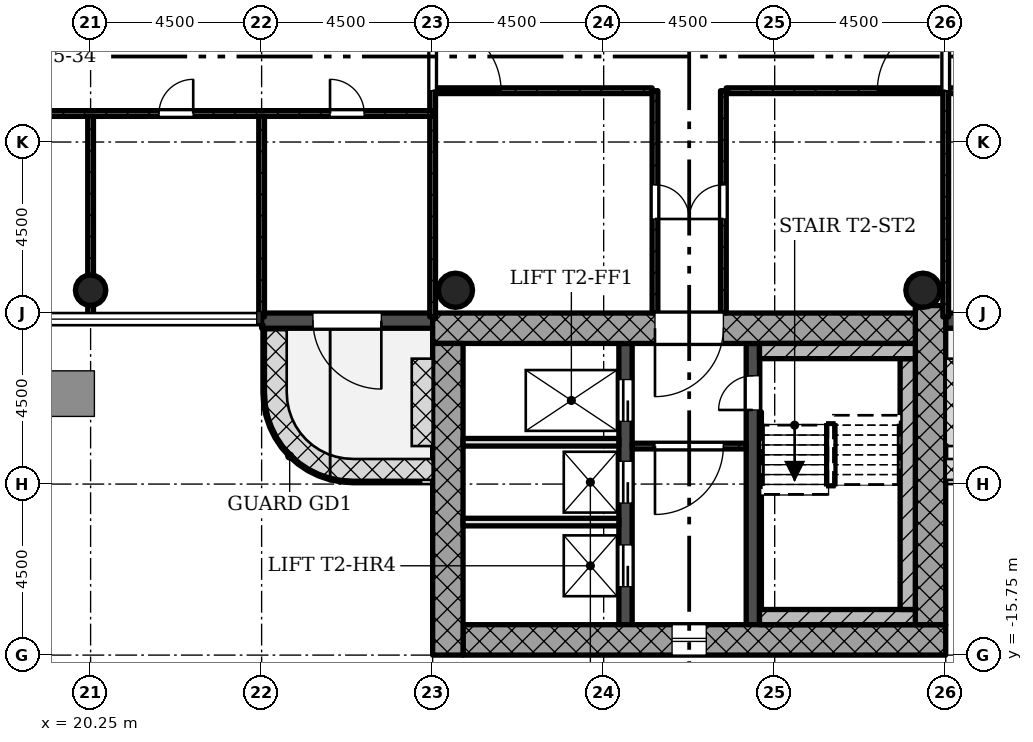
"""IFC4 building model, lengths in metres.
Left out: names, types, materials, properties, quantities, classifications, styles, units other than length and angle.
Written with IfcOpenShell. Run it as: python <this file> out.ifc"""

import sys

from ifc_helpers import new_model, si_unit, direction, frame, frame_2d, origin, origin_2d, place, context, subcontext, project, spatial, rectangle, hollow_circle, extrude, element, fill, save


model = new_model("IFC4")
c1 = context("Model", 3, precision=1e-05, world=origin(), true_north=direction((0.0, 1.0)))
c2 = subcontext(c1, "Body", "Model", "MODEL_VIEW")
j1 = project(units=[si_unit("LENGTHUNIT", "METRE"), si_unit("PLANEANGLEUNIT", "RADIAN")], contexts=[c1])
p1 = place(None, origin())
s1 = spatial("IfcSite", under=j1, at=p1, CompositionType="ELEMENT")
p2 = place(p1, origin())
s2 = spatial("IfcBuilding", under=s1, at=p2, CompositionType="ELEMENT")
p3 = place(p2, frame((0.0, 0.0, 128.7)))
s3 = spatial("IfcBuildingStorey", under=s2, at=p3, CompositionType="ELEMENT", Elevation=128.7)
p4 = place(p3, frame((30.05, -15.35, 0.0), z_axis=(0.0, 0.0, 1.0), x_axis=(1.0, 0.0, 0.0)))
e1 = element("IfcWall", 1, at=p4, inside=s3, PredefinedType="SHEAR", context=c2, shape_type="SweptSolid", body=[
    extrude(rectangle(XDim=12.7, YDim=0.8, at=frame_2d((6.35, 0.0))), origin(), (0.0, 0.0, 1.0), 5.0),
])
p5 = place(p4, frame((5.5, 0.0, 0.45)))
e2 = element("IfcOpeningElement", 2, at=p5, cuts=e1, PredefinedType="OPENING", context=c2, shape_type="SweptSolid", body=[
    extrude(rectangle(XDim=0.9, YDim=2.4, at=frame_2d((0.45, 1.2))), frame((0.0, 0.41, 0.0), z_axis=(0.0, -1.0, 0.0), x_axis=(1.0, 0.0, 0.0)), (0.0, 0.0, 1.0), 0.82),
])
p6 = place(p3, frame((42.35, -14.95, 0.0), z_axis=(0.0, 0.0, 1.0), x_axis=(0.0, 1.0, 0.0)))
e3 = element("IfcWall", 3, at=p6, inside=s3, PredefinedType="SHEAR", context=c2, shape_type="SweptSolid", body=[
    extrude(rectangle(XDim=8.398, YDim=0.8, at=frame_2d((4.199, 0.0))), origin(), (0.0, 0.0, 1.0), 5.0),
])
p7 = place(p3, frame((41.95, -7.15, 0.0), z_axis=(0.0, 0.0, 1.0), x_axis=(-1.0, 0.0, 0.0)))
e4 = element("IfcWall", 4, at=p7, inside=s3, PredefinedType="SHEAR", context=c2, shape_type="SweptSolid", body=[
    extrude(rectangle(XDim=12.7, YDim=0.8, at=frame_2d((6.35, 0.0))), origin(), (0.0, 0.0, 1.0), 5.0),
])
p8 = place(p7, frame((5.05, 0.0, 0.0)))
e5 = element("IfcOpeningElement", 5, at=p8, cuts=e4, PredefinedType="OPENING", context=c2, shape_type="SweptSolid", body=[
    extrude(rectangle(XDim=1.8, YDim=2.1, at=frame_2d((0.9, 1.05))), frame((0.0, 0.41, 0.0), z_axis=(0.0, -1.0, 0.0), x_axis=(1.0, 0.0, 0.0)), (0.0, 0.0, 1.0), 0.82),
])
p9 = place(p3, frame((29.65, -7.55, 0.0), z_axis=(0.0, 0.0, 1.0), x_axis=(0.0, -1.0, 0.0)))
e6 = element("IfcWall", 6, at=p9, inside=s3, PredefinedType="SHEAR", context=c2, shape_type="SweptSolid", body=[
    extrude(rectangle(XDim=8.2, YDim=0.8, at=frame_2d((4.1, 0.0))), origin(), (0.0, 0.0, 1.0), 5.0),
])
p10 = place(p3, frame((34.325, -14.95, 0.0), z_axis=(0.0, 0.0, 1.0), x_axis=(0.0, 1.0, 0.0)))
e7 = element("IfcWall", 7, at=p10, inside=s3, PredefinedType="SHEAR", context=c2, shape_type="SweptSolid", body=[
    extrude(rectangle(XDim=7.4, YDim=0.35, at=frame_2d((3.7, 0.0))), origin(), (0.0, 0.0, 1.0), 5.0),
])
p11 = place(p10, frame((5.35, 0.0, 0.0)))
e8 = element("IfcOpeningElement", 8, at=p11, cuts=e7, PredefinedType="OPENING", context=c2, shape_type="SweptSolid", body=[
    extrude(rectangle(XDim=1.1, YDim=2.1, at=frame_2d((0.55, 1.05))), frame((0.0, 0.185, 0.0), z_axis=(0.0, -1.0, 0.0), x_axis=(1.0, 0.0, 0.0)), (0.0, 0.0, 1.0), 0.37),
])
p12 = place(p10, frame((3.2, 0.0, 0.0)))
e9 = element("IfcOpeningElement", 9, at=p12, cuts=e7, PredefinedType="OPENING", context=c2, shape_type="SweptSolid", body=[
    extrude(rectangle(XDim=1.1, YDim=2.1, at=frame_2d((0.55, 1.05))), frame((0.0, 0.185, 0.0), z_axis=(0.0, -1.0, 0.0), x_axis=(1.0, 0.0, 0.0)), (0.0, 0.0, 1.0), 0.37),
])
p13 = place(p10, frame((1.0, 0.0, 0.0)))
e10 = element("IfcOpeningElement", 10, at=p13, cuts=e7, PredefinedType="OPENING", context=c2, shape_type="SweptSolid", body=[
    extrude(rectangle(XDim=1.1, YDim=2.1, at=frame_2d((0.55, 1.05))), frame((0.0, 0.185, 0.0), z_axis=(0.0, -1.0, 0.0), x_axis=(1.0, 0.0, 0.0)), (0.0, 0.0, 1.0), 0.37),
])
p14 = place(p3, frame((37.675, -14.95, 0.0), z_axis=(0.0, 0.0, 1.0), x_axis=(0.0, 1.0, 0.0)))
e11 = element("IfcWall", 11, at=p14, inside=s3, PredefinedType="SHEAR", context=c2, shape_type="SweptSolid", body=[
    extrude(rectangle(XDim=7.4, YDim=0.35, at=frame_2d((3.7, 0.0))), origin(), (0.0, 0.0, 1.0), 5.0),
])
p15 = place(p14, frame((5.65, 0.0, 0.0)))
e12 = element("IfcOpeningElement", 12, at=p15, cuts=e11, PredefinedType="OPENING", context=c2, shape_type="SweptSolid", body=[
    extrude(rectangle(XDim=0.9, YDim=2.1, at=frame_2d((0.45, 1.05))), frame((0.0, 0.185, 0.0), z_axis=(0.0, -1.0, 0.0), x_axis=(1.0, 0.0, 0.0)), (0.0, 0.0, 1.0), 0.37),
])
p16 = place(p3, frame((20.25, -6.15, 0.0), z_axis=(0.0, 0.0, 1.0), x_axis=(1.0, 0.0, 0.0)))
e13 = element("IfcColumn", 13, at=p16, inside=s3, PredefinedType="COLUMN", context=c2, shape_type="SweptSolid", body=[
    extrude(hollow_circle(Radius=0.4, WallThickness=0.028, at=origin_2d()), origin(), (0.0, 0.0, 1.0), 5.0),
])
for number, where, z_axis, x_axis in (
    (14, (42.15, -6.15, 0.0), (0.0, 0.0, 1.0), (1.0, 0.0, 0.0)),
    (15, (29.85, -6.15, 0.0), (0.0, 0.0, 1.0), (1.0, 0.0, 0.0)),
):
    element("IfcColumn", number, at=place(p3, frame(where, z_axis=z_axis, x_axis=x_axis)), inside=s3, PredefinedType="COLUMN", context=c2, shape_type="SweptSolid", body=[
        extrude(hollow_circle(Radius=0.45, WallThickness=0.032, at=origin_2d()), origin(), (0.0, 0.0, 1.0), 5.0),
    ])
p17 = place(p3, frame((42.75, -6.95, -0.02), z_axis=(0.0, 0.0, 1.0), x_axis=(1.0, 0.0, 0.0)))
e16 = element("IfcWall", 16, at=p17, inside=s3, PredefinedType="STANDARD", context=c2, shape_type="SweptSolid", body=[
    extrude(rectangle(XDim=4.5, YDim=0.4, at=frame_2d((2.25, 0.0))), origin(), (0.0, 0.0, 1.0), 4.72),
])
p18 = place(p17, frame((1.35, 0.0, 0.02)))
e17 = element("IfcOpeningElement", 17, at=p18, cuts=e16, PredefinedType="OPENING", context=c2, shape_type="SweptSolid", body=[
    extrude(rectangle(XDim=1.8, YDim=2.1, at=frame_2d((0.9, 1.05))), frame((0.0, 0.21, 0.0), z_axis=(0.0, -1.0, 0.0), x_axis=(1.0, 0.0, 0.0)), (0.0, 0.0, 1.0), 0.42),
])
p19 = place(p3, frame((24.75, -6.95, -0.02), z_axis=(0.0, 0.0, 1.0), x_axis=(1.0, 0.0, 0.0)))
e18 = element("IfcWall", 18, at=p19, inside=s3, PredefinedType="STANDARD", context=c2, shape_type="SweptSolid", body=[
    extrude(rectangle(XDim=4.5, YDim=0.4, at=frame_2d((2.25, 0.0))), origin(), (0.0, 0.0, 1.0), 4.72),
])
p20 = place(p19, frame((1.35, 0.0, 0.02)))
e19 = element("IfcOpeningElement", 19, at=p20, cuts=e18, PredefinedType="OPENING", context=c2, shape_type="SweptSolid", body=[
    extrude(rectangle(XDim=1.8, YDim=2.1, at=frame_2d((0.9, 1.05))), frame((0.0, 0.21, 0.0), z_axis=(0.0, -1.0, 0.0), x_axis=(1.0, 0.0, 0.0)), (0.0, 0.0, 1.0), 0.42),
])
p21 = place(p3, frame((34.5, -10.25, 0.0), z_axis=(0.0, 0.0, 1.0), x_axis=(1.0, 0.0, 0.0)))
e20 = element("IfcWall", 20, at=p21, inside=s3, PredefinedType="PARTITIONING", context=c2, shape_type="SweptSolid", body=[
    extrude(rectangle(XDim=3.0, YDim=0.15, at=frame_2d((1.5, 0.0))), origin(), (0.0, 0.0, 1.0), 4.58),
])
p22 = place(p21, frame((0.6, 0.0, 0.0)))
e21 = element("IfcOpeningElement", 21, at=p22, cuts=e20, PredefinedType="OPENING", context=c2, shape_type="SweptSolid", body=[
    extrude(rectangle(XDim=1.8, YDim=2.1, at=frame_2d((0.9, 1.05))), frame((0.0, 0.085, 0.0), z_axis=(0.0, -1.0, 0.0), x_axis=(1.0, 0.0, 0.0)), (0.0, 0.0, 1.0), 0.17),
])
for number, where, z_axis, x_axis in (
    (22, (30.05, -10.15, 0.0), (0.0, 0.0, 1.0), (1.0, 0.0, 0.0)),
    (23, (30.05, -12.25, 0.0), (0.0, 0.0, 1.0), (1.0, 0.0, 0.0)),
):
    element("IfcWall", number, at=place(p3, frame(where, z_axis=z_axis, x_axis=x_axis)), inside=s3, PredefinedType="SOLIDWALL", context=c2, shape_type="SweptSolid", body=[
        extrude(rectangle(XDim=4.1, YDim=0.2, at=frame_2d((2.05, 0.0))), origin(), (0.0, 0.0, 1.0), 4.58),
    ])
p23 = place(p3, frame((35.1, -6.75, 0.0), z_axis=(0.0, 0.0, 1.0), x_axis=(0.0, 1.0, 0.0)))
e24 = element("IfcWall", 24, at=p23, inside=s3, PredefinedType="PARTITIONING", context=c2, shape_type="SweptSolid", body=[
    extrude(rectangle(XDim=5.85, YDim=0.15, at=frame_2d((2.925, 0.0))), origin(), (0.0, 0.0, 1.0), 4.58),
])
p24 = place(p23, frame((2.475, 0.0, 0.0)))
e25 = element("IfcOpeningElement", 25, at=p24, cuts=e24, PredefinedType="OPENING", context=c2, shape_type="SweptSolid", body=[
    extrude(rectangle(XDim=0.9, YDim=2.1, at=frame_2d((0.45, 1.05))), frame((0.0, 0.085, 0.0), z_axis=(0.0, -1.0, 0.0), x_axis=(1.0, 0.0, 0.0)), (0.0, 0.0, 1.0), 0.17),
])
p25 = place(p3, frame((35.025, -0.9, 0.0), z_axis=(0.0, 0.0, 1.0), x_axis=(-1.0, 0.0, 0.0)))
e26 = element("IfcWall", 26, at=p25, inside=s3, PredefinedType="PARTITIONING", context=c2, shape_type="SweptSolid", body=[
    extrude(rectangle(XDim=5.7, YDim=0.15, at=frame_2d((2.85, 0.0))), origin(), (0.0, 0.0, 1.0), 4.58),
])
p26 = place(p3, frame((36.9, -6.75, 0.0), z_axis=(0.0, 0.0, 1.0), x_axis=(0.0, 1.0, 0.0)))
e27 = element("IfcWall", 27, at=p26, inside=s3, PredefinedType="PARTITIONING", context=c2, shape_type="SweptSolid", body=[
    extrude(rectangle(XDim=5.85, YDim=0.15, at=frame_2d((2.925, 0.0))), origin(), (0.0, 0.0, 1.0), 4.58),
])
p27 = place(p26, frame((2.475, 0.0, 0.0)))
e28 = element("IfcOpeningElement", 28, at=p27, cuts=e27, PredefinedType="OPENING", context=c2, shape_type="SweptSolid", body=[
    extrude(rectangle(XDim=0.9, YDim=2.1, at=frame_2d((0.45, 1.05))), frame((0.0, 0.085, 0.0), z_axis=(0.0, -1.0, 0.0), x_axis=(1.0, 0.0, 0.0)), (0.0, 0.0, 1.0), 0.17),
])
p28 = place(p3, frame((42.675, -0.9, 0.0), z_axis=(0.0, 0.0, 1.0), x_axis=(-1.0, 0.0, 0.0)))
e29 = element("IfcWall", 29, at=p28, inside=s3, PredefinedType="PARTITIONING", context=c2, shape_type="SweptSolid", body=[
    extrude(rectangle(XDim=5.7, YDim=0.15, at=frame_2d((2.85, 0.0))), origin(), (0.0, 0.0, 1.0), 4.58),
])
p29 = place(p3, frame((29.25, -6.85, 0.0), z_axis=(0.0, 0.0, 1.0), x_axis=(0.0, 1.0, 0.0)))
e30 = element("IfcWall", 30, at=p29, inside=s3, PredefinedType="PARTITIONING", context=c2, shape_type="SweptSolid", body=[
    extrude(rectangle(XDim=13.7, YDim=0.15, at=frame_2d((6.85, 0.0))), origin(), (0.0, 0.0, 1.0), 4.58),
])
p30 = place(p29, frame((5.95, 0.0, 0.0)))
e31 = element("IfcOpeningElement", 31, at=p30, cuts=e30, PredefinedType="OPENING", context=c2, shape_type="SweptSolid", body=[
    extrude(rectangle(XDim=1.8, YDim=2.1, at=frame_2d((0.9, 1.05))), frame((0.0, 0.085, 0.0), z_axis=(0.0, -1.0, 0.0), x_axis=(1.0, 0.0, 0.0)), (0.0, 0.0, 1.0), 0.17),
])
p31 = place(p3, frame((29.25, -1.5, 0.0), z_axis=(0.0, 0.0, 1.0), x_axis=(-1.0, 0.0, 0.0)))
e32 = element("IfcWall", 32, at=p31, inside=s3, PredefinedType="PARTITIONING", context=c2, shape_type="SweptSolid", body=[
    extrude(rectangle(XDim=13.6, YDim=0.15, at=frame_2d((6.8, 0.0))), origin(), (0.0, 0.0, 1.0), 4.58),
])
p32 = place(p31, frame((1.8, 0.0, 0.0)))
e33 = element("IfcOpeningElement", 33, at=p32, cuts=e32, PredefinedType="OPENING", context=c2, shape_type="SweptSolid", body=[
    extrude(rectangle(XDim=0.9, YDim=2.1, at=frame_2d((0.45, 1.05))), frame((0.0, 0.085, 0.0), z_axis=(0.0, -1.0, 0.0), x_axis=(1.0, 0.0, 0.0)), (0.0, 0.0, 1.0), 0.17),
])
p33 = place(p31, frame((6.3, 0.0, 0.0)))
e34 = element("IfcOpeningElement", 34, at=p33, cuts=e32, PredefinedType="OPENING", context=c2, shape_type="SweptSolid", body=[
    extrude(rectangle(XDim=0.9, YDim=2.1, at=frame_2d((0.45, 1.05))), frame((0.0, 0.085, 0.0), z_axis=(0.0, -1.0, 0.0), x_axis=(1.0, 0.0, 0.0)), (0.0, 0.0, 1.0), 0.17),
])
p34 = place(p31, frame((10.8, 0.0, 0.0)))
e35 = element("IfcOpeningElement", 35, at=p34, cuts=e32, PredefinedType="OPENING", context=c2, shape_type="SweptSolid", body=[
    extrude(rectangle(XDim=0.9, YDim=2.1, at=frame_2d((0.45, 1.05))), frame((0.0, 0.085, 0.0), z_axis=(0.0, -1.0, 0.0), x_axis=(1.0, 0.0, 0.0)), (0.0, 0.0, 1.0), 0.17),
])
for number, where, z_axis, x_axis in (
    (36, (24.75, -1.575, 0.0), (0.0, 0.0, 1.0), (0.0, -1.0, 0.0)),
    (37, (20.25, -1.575, 0.0), (0.0, 0.0, 1.0), (0.0, -1.0, 0.0)),
):
    element("IfcWall", number, at=place(p3, frame(where, z_axis=z_axis, x_axis=x_axis)), inside=s3, PredefinedType="PARTITIONING", context=c2, shape_type="SweptSolid", body=[
        extrude(rectangle(XDim=5.275, YDim=0.15, at=frame_2d((2.638, 0.0))), origin(), (0.0, 0.0, 1.0), 4.58),
    ])
p35 = place(p3, frame((42.75, -6.85, 0.0), z_axis=(0.0, 0.0, 1.0), x_axis=(0.0, 1.0, 0.0)))
e38 = element("IfcWall", 38, at=p35, inside=s3, PredefinedType="PARTITIONING", context=c2, shape_type="SweptSolid", body=[
    extrude(rectangle(XDim=13.7, YDim=0.15, at=frame_2d((6.85, 0.0))), origin(), (0.0, 0.0, 1.0), 4.58),
])
p36 = place(p35, frame((5.95, 0.0, 0.0)))
e39 = element("IfcOpeningElement", 39, at=p36, cuts=e38, PredefinedType="OPENING", context=c2, shape_type="SweptSolid", body=[
    extrude(rectangle(XDim=1.8, YDim=2.1, at=frame_2d((0.9, 1.05))), frame((0.0, 0.085, 0.0), z_axis=(0.0, -1.0, 0.0), x_axis=(1.0, 0.0, 0.0)), (0.0, 0.0, 1.0), 0.17),
])
p37 = place(p3, frame((56.35, -0.9, 0.0), z_axis=(0.0, 0.0, 1.0), x_axis=(-1.0, 0.0, 0.0)))
e40 = element("IfcWall", 40, at=p37, inside=s3, PredefinedType="PARTITIONING", context=c2, shape_type="SweptSolid", body=[
    extrude(rectangle(XDim=13.525, YDim=0.15, at=frame_2d((6.763, 0.0))), origin(), (0.0, 0.0, 1.0), 4.58),
])
p38 = place(p37, frame((1.9, 0.0, 0.0)))
e41 = element("IfcOpeningElement", 41, at=p38, cuts=e40, PredefinedType="OPENING", context=c2, shape_type="SweptSolid", body=[
    extrude(rectangle(XDim=0.9, YDim=2.1, at=frame_2d((0.45, 1.05))), frame((0.0, 0.085, 0.0), z_axis=(0.0, -1.0, 0.0), x_axis=(1.0, 0.0, 0.0)), (0.0, 0.0, 1.0), 0.17),
])
p39 = place(p37, frame((6.4, 0.0, 0.0)))
e42 = element("IfcOpeningElement", 42, at=p39, cuts=e40, PredefinedType="OPENING", context=c2, shape_type="SweptSolid", body=[
    extrude(rectangle(XDim=0.9, YDim=2.1, at=frame_2d((0.45, 1.05))), frame((0.0, 0.085, 0.0), z_axis=(0.0, -1.0, 0.0), x_axis=(1.0, 0.0, 0.0)), (0.0, 0.0, 1.0), 0.17),
])
p40 = place(p37, frame((10.9, 0.0, 0.0)))
e43 = element("IfcOpeningElement", 43, at=p40, cuts=e40, PredefinedType="OPENING", context=c2, shape_type="SweptSolid", body=[
    extrude(rectangle(XDim=0.9, YDim=2.1, at=frame_2d((0.45, 1.05))), frame((0.0, 0.085, 0.0), z_axis=(0.0, -1.0, 0.0), x_axis=(1.0, 0.0, 0.0)), (0.0, 0.0, 1.0), 0.17),
])
p41 = place(p3, frame((37.85, -14.75, 0.0), z_axis=(0.0, 0.0, 1.0), x_axis=(1.0, 0.0, 0.0)))
e44 = element("IfcWall", 44, at=p41, inside=s3, PredefinedType="SHEAR", context=c2, shape_type="SweptSolid", body=[
    extrude(rectangle(XDim=4.1, YDim=0.4, at=frame_2d((2.05, 0.0))), origin(), (0.0, 0.0, 1.0), 5.0),
])
p42 = place(p3, frame((41.75, -7.95, 0.0), z_axis=(0.0, 0.0, 1.0), x_axis=(0.0, -1.0, 0.0)))
e45 = element("IfcWall", 45, at=p42, inside=s3, PredefinedType="SHEAR", context=c2, shape_type="SweptSolid", body=[
    extrude(rectangle(XDim=6.6, YDim=0.4, at=frame_2d((3.3, 0.0))), origin(), (0.0, 0.0, 1.0), 5.0),
])
p43 = place(p3, frame((37.85, -7.75, 0.0), z_axis=(0.0, 0.0, 1.0), x_axis=(1.0, 0.0, 0.0)))
e46 = element("IfcWall", 46, at=p43, inside=s3, PredefinedType="SHEAR", context=c2, shape_type="SweptSolid", body=[
    extrude(rectangle(XDim=4.1, YDim=0.4, at=frame_2d((2.05, 0.0))), origin(), (0.0, 0.0, 1.0), 5.0),
])
p44 = place(p3, frame((37.875, -9.35, 0.0), z_axis=(0.0, 0.0, 1.0), x_axis=(0.0, -1.0, 0.0)))
e47 = element("IfcWall", 47, at=p44, inside=s3, PredefinedType="SHEAR", context=c2, shape_type="SweptSolid", body=[
    extrude(rectangle(XDim=5.2, YDim=0.05, at=frame_2d((2.6, 0.0))), origin(), (0.0, 0.0, 1.0), 5.0),
])
p45 = place(p20, origin())
e48 = element("IfcDoor", 48, at=p45, inside=s3, OperationType="SINGLE_SWING_RIGHT", PredefinedType="DOOR", context=c2, shape_type="SweptSolid", body=[
    extrude(rectangle(XDim=1.8, YDim=2.1, at=frame_2d((0.9, 1.05))), frame((0.0, 0.025, 0.0), z_axis=(0.0, -1.0, 0.0), x_axis=(1.0, 0.0, 0.0)), (0.0, 0.0, 1.0), 0.05),
])
fill(e19, e48)
p46 = place(p5, origin())
e49 = element("IfcWindow", 49, at=p46, inside=s3, PartitioningType="SINGLE_PANEL", PredefinedType="WINDOW", context=c2, shape_type="SweptSolid", body=[
    extrude(rectangle(XDim=0.9, YDim=2.4, at=frame_2d((0.45, 1.2))), frame((0.0, 0.03, 0.0), z_axis=(0.0, -1.0, 0.0), x_axis=(1.0, 0.0, 0.0)), (0.0, 0.0, 1.0), 0.06),
])
fill(e2, e49)
p47 = place(p22, origin())
e50 = element("IfcDoor", 50, at=p47, inside=s3, OperationType="SINGLE_SWING_LEFT", PredefinedType="DOOR", context=c2, shape_type="SweptSolid", body=[
    extrude(rectangle(XDim=1.8, YDim=2.1, at=frame_2d((0.9, 1.05))), frame((0.0, 0.025, 0.0), z_axis=(0.0, -1.0, 0.0), x_axis=(1.0, 0.0, 0.0)), (0.0, 0.0, 1.0), 0.05),
])
fill(e21, e50)
p48 = place(p24, origin())
e51 = element("IfcDoor", 51, at=p48, inside=s3, OperationType="SINGLE_SWING_LEFT", PredefinedType="DOOR", context=c2, shape_type="SweptSolid", body=[
    extrude(rectangle(XDim=0.9, YDim=2.1, at=frame_2d((0.45, 1.05))), frame((0.0, 0.025, 0.0), z_axis=(0.0, -1.0, 0.0), x_axis=(1.0, 0.0, 0.0)), (0.0, 0.0, 1.0), 0.05),
])
fill(e25, e51)
p49 = place(p27, origin())
e52 = element("IfcDoor", 52, at=p49, inside=s3, OperationType="SINGLE_SWING_RIGHT", PredefinedType="DOOR", context=c2, shape_type="SweptSolid", body=[
    extrude(rectangle(XDim=0.9, YDim=2.1, at=frame_2d((0.45, 1.05))), frame((0.0, 0.025, 0.0), z_axis=(0.0, -1.0, 0.0), x_axis=(1.0, 0.0, 0.0)), (0.0, 0.0, 1.0), 0.05),
])
fill(e28, e52)
p50 = place(p30, origin())
e53 = element("IfcDoor", 53, at=p50, inside=s3, OperationType="SINGLE_SWING_LEFT", PredefinedType="DOOR", context=c2, shape_type="SweptSolid", body=[
    extrude(rectangle(XDim=1.8, YDim=2.1, at=frame_2d((0.9, 1.05))), frame((0.0, 0.025, 0.0), z_axis=(0.0, -1.0, 0.0), x_axis=(1.0, 0.0, 0.0)), (0.0, 0.0, 1.0), 0.05),
])
fill(e31, e53)
p51 = place(p32, origin())
e54 = element("IfcDoor", 54, at=p51, inside=s3, OperationType="SINGLE_SWING_RIGHT", PredefinedType="DOOR", context=c2, shape_type="SweptSolid", body=[
    extrude(rectangle(XDim=0.9, YDim=2.1, at=frame_2d((0.45, 1.05))), frame((0.0, 0.025, 0.0), z_axis=(0.0, -1.0, 0.0), x_axis=(1.0, 0.0, 0.0)), (0.0, 0.0, 1.0), 0.05),
])
fill(e33, e54)
p52 = place(p33, origin())
e55 = element("IfcDoor", 55, at=p52, inside=s3, OperationType="SINGLE_SWING_LEFT", PredefinedType="DOOR", context=c2, shape_type="SweptSolid", body=[
    extrude(rectangle(XDim=0.9, YDim=2.1, at=frame_2d((0.45, 1.05))), frame((0.0, 0.025, 0.0), z_axis=(0.0, -1.0, 0.0), x_axis=(1.0, 0.0, 0.0)), (0.0, 0.0, 1.0), 0.05),
])
fill(e34, e55)
p53 = place(p36, origin())
e56 = element("IfcDoor", 56, at=p53, inside=s3, OperationType="SINGLE_SWING_RIGHT", PredefinedType="DOOR", context=c2, shape_type="SweptSolid", body=[
    extrude(rectangle(XDim=1.8, YDim=2.1, at=frame_2d((0.9, 1.05))), frame((0.0, 0.025, 0.0), z_axis=(0.0, -1.0, 0.0), x_axis=(1.0, 0.0, 0.0)), (0.0, 0.0, 1.0), 0.05),
])
fill(e39, e56)
p54 = place(p15, origin())
e57 = element("IfcDoor", 57, at=p54, inside=s3, OperationType="SINGLE_SWING_RIGHT", PredefinedType="DOOR", context=c2, shape_type="SweptSolid", body=[
    extrude(rectangle(XDim=0.9, YDim=2.1, at=frame_2d((0.45, 1.05))), frame((0.0, 0.025, 0.0), z_axis=(0.0, -1.0, 0.0), x_axis=(1.0, 0.0, 0.0)), (0.0, 0.0, 1.0), 0.05),
])
fill(e12, e57)
p55 = place(p11, origin())
e58 = element("IfcDoor", 58, at=p55, inside=s3, OperationType="SLIDING_TO_LEFT", PredefinedType="DOOR", context=c2, shape_type="SweptSolid", body=[
    extrude(rectangle(XDim=1.1, YDim=2.1, at=frame_2d((0.55, 1.05))), frame((0.0, 0.025, 0.0), z_axis=(0.0, -1.0, 0.0), x_axis=(1.0, 0.0, 0.0)), (0.0, 0.0, 1.0), 0.05),
])
fill(e8, e58)
p56 = place(p12, origin())
e59 = element("IfcDoor", 59, at=p56, inside=s3, OperationType="SLIDING_TO_LEFT", PredefinedType="DOOR", context=c2, shape_type="SweptSolid", body=[
    extrude(rectangle(XDim=1.1, YDim=2.1, at=frame_2d((0.55, 1.05))), frame((0.0, 0.025, 0.0), z_axis=(0.0, -1.0, 0.0), x_axis=(1.0, 0.0, 0.0)), (0.0, 0.0, 1.0), 0.05),
])
fill(e9, e59)
p57 = place(p13, origin())
e60 = element("IfcDoor", 60, at=p57, inside=s3, OperationType="SLIDING_TO_LEFT", PredefinedType="DOOR", context=c2, shape_type="SweptSolid", body=[
    extrude(rectangle(XDim=1.1, YDim=2.1, at=frame_2d((0.55, 1.05))), frame((0.0, 0.025, 0.0), z_axis=(0.0, -1.0, 0.0), x_axis=(1.0, 0.0, 0.0)), (0.0, 0.0, 1.0), 0.05),
])
fill(e10, e60)
p58 = place(p8, origin())
e61 = element("IfcDoor", 61, at=p58, inside=s3, OperationType="SINGLE_SWING_LEFT", PredefinedType="DOOR", context=c2, shape_type="SweptSolid", body=[
    extrude(rectangle(XDim=1.8, YDim=2.1, at=frame_2d((0.9, 1.05))), frame((0.0, 0.025, 0.0), z_axis=(0.0, -1.0, 0.0), x_axis=(1.0, 0.0, 0.0)), (0.0, 0.0, 1.0), 0.05),
])
fill(e5, e61)
save(model, sys.argv[1])
